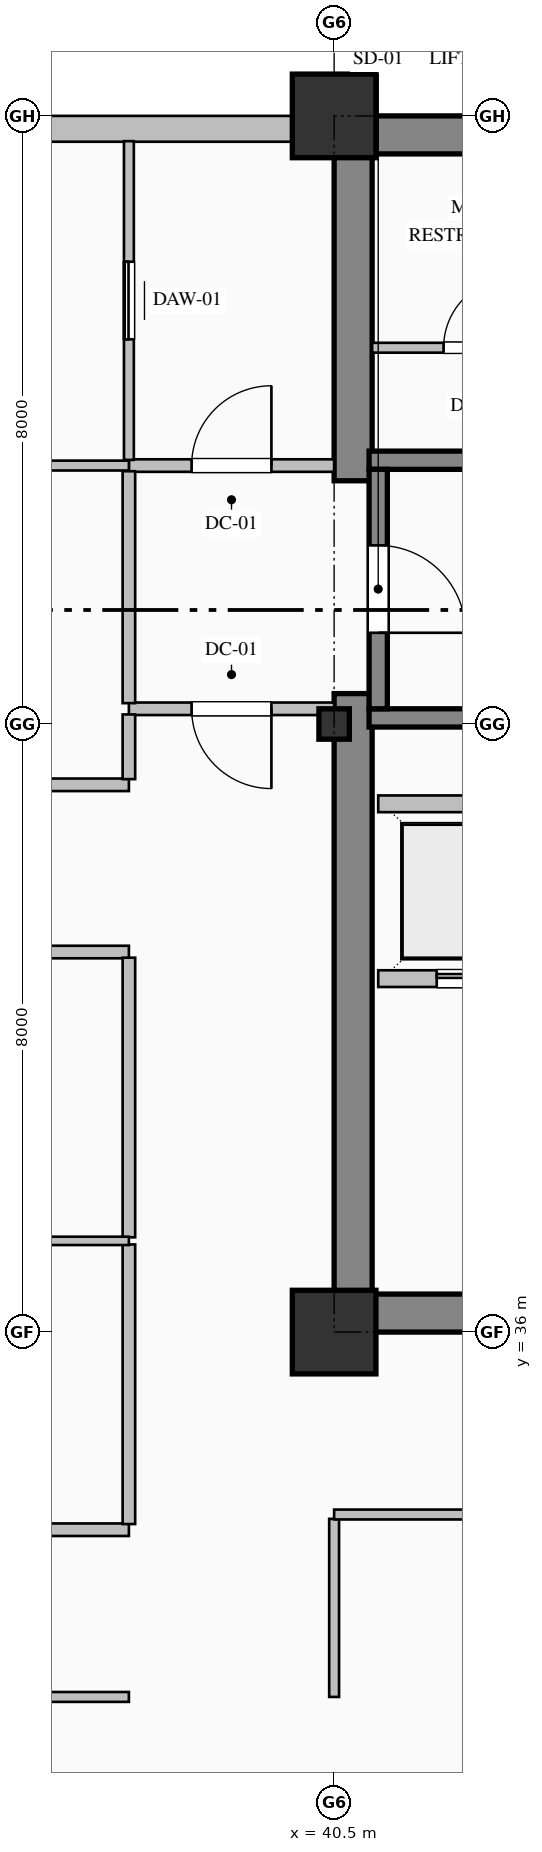
"""IFC4 building model, lengths in metres.
Left out: names, types, materials, properties, quantities, classifications, styles, units other than length and angle.
Written with IfcOpenShell. Run it as: python <this file> out.ifc"""

import sys

from ifc_helpers import new_model, si_unit, direction, frame, frame_2d, origin, origin_2d, place, context, subcontext, project, spatial, rectangle, hollow_rectangle, i_section, extrude, element, fill, save


model = new_model("IFC4")
c1 = context("Model", 3, precision=1e-05, world=origin(), true_north=direction((0.0, 1.0)))
c2 = subcontext(c1, "Body", "Model", "MODEL_VIEW")
j1 = project(units=[si_unit("LENGTHUNIT", "METRE"), si_unit("PLANEANGLEUNIT", "RADIAN")], contexts=[c1])
p1 = place(None, origin())
s1 = spatial("IfcSite", under=j1, at=p1, CompositionType="ELEMENT")
p2 = place(p1, origin())
s2 = spatial("IfcBuilding", under=s1, at=p2, CompositionType="ELEMENT")
p3 = place(p2, frame((0.0, 0.0, 187.0)))
s3 = spatial("IfcBuildingStorey", under=s2, at=p3, CompositionType="ELEMENT", Elevation=187.0)
p4 = place(p3, frame((40.5, 51.75, 0.0), z_axis=(0.0, 0.0, 1.0), x_axis=(1.0, 0.0, 0.0)))
e1 = element("IfcWall", 1, at=p4, inside=s3, PredefinedType="SHEAR", context=c2, shape_type="SweptSolid", body=[
    extrude(rectangle(XDim=23.5, YDim=0.5, at=frame_2d((11.75, 0.0))), origin(), (0.0, 0.0, 1.0), 3.765),
])
p5 = place(p3, frame((40.75, 36.5, 0.0), z_axis=(0.0, 0.0, 1.0), x_axis=(0.0, 1.0, 0.0)))
e2 = element("IfcWall", 2, at=p5, inside=s3, PredefinedType="SHEAR", context=c2, shape_type="SweptSolid", body=[
    extrude(rectangle(XDim=7.9, YDim=0.5, at=frame_2d((3.95, 0.0))), origin(), (0.0, 0.0, 1.0), 3.765),
])
p6 = place(p3, frame((40.75, 47.2, 0.0), z_axis=(0.0, 0.0, 1.0), x_axis=(0.0, 1.0, 0.0)))
e3 = element("IfcWall", 3, at=p6, inside=s3, PredefinedType="SHEAR", context=c2, shape_type="SweptSolid", body=[
    extrude(rectangle(XDim=4.3, YDim=0.5, at=frame_2d((2.15, 0.0))), origin(), (0.0, 0.0, 1.0), 3.765),
])
p7 = place(p3, frame((40.5, 36.25, 0.0), z_axis=(0.0, 0.0, 1.0), x_axis=(1.0, 0.0, 0.0)))
e4 = element("IfcWall", 4, at=p7, inside=s3, PredefinedType="SHEAR", context=c2, shape_type="SweptSolid", body=[
    extrude(rectangle(XDim=9.1, YDim=0.5, at=frame_2d((4.55, 0.0))), origin(), (0.0, 0.0, 1.0), 3.765),
])
p8 = place(p3, frame((40.5, 36.0, 0.0), z_axis=(0.0, 0.0, 1.0), x_axis=(1.0, 0.0, 0.0)))
e5 = element("IfcColumn", 5, at=p8, inside=s3, PredefinedType="COLUMN", context=c2, shape_type="SweptSolid", body=[
    extrude(hollow_rectangle(XDim=1.1, YDim=1.1, WallThickness=0.04, at=origin_2d()), origin(), (0.0, 0.0, 1.0), 4.0),
])
p9 = place(p3, frame((40.5, 44.0, 0.0), z_axis=(0.0, 0.0, 1.0), x_axis=(1.0, 0.0, 0.0)))
e6 = element("IfcColumn", 6, at=p9, inside=s3, PredefinedType="COLUMN", context=c2, shape_type="SweptSolid", body=[
    extrude(i_section(OverallWidth=0.4, OverallDepth=0.4, WebThickness=0.013, FlangeThickness=0.021, FilletRadius=0.022, at=origin_2d()), origin(), (0.0, 0.0, 1.0), 4.0),
])
p10 = place(p3, frame((40.5, 52.0, 0.0), z_axis=(0.0, 0.0, 1.0), x_axis=(1.0, 0.0, 0.0)))
e7 = element("IfcColumn", 7, at=p10, inside=s3, PredefinedType="COLUMN", context=c2, shape_type="SweptSolid", body=[
    extrude(hollow_rectangle(XDim=1.1, YDim=1.1, WallThickness=0.04, at=origin_2d()), origin(), (0.0, 0.0, 1.0), 4.0),
])
p11 = place(p3, frame((13.0, 51.83, 0.0), z_axis=(0.0, 0.0, 1.0), x_axis=(1.0, 0.0, 0.0)))
e8 = element("IfcWall", 8, at=p11, inside=s3, PredefinedType="SOLIDWALL", context=c2, shape_type="SweptSolid", body=[
    extrude(rectangle(XDim=27.52, YDim=0.34, at=frame_2d((13.76, 0.0))), origin(), (0.0, 0.0, 1.0), 3.265),
])
p12 = place(p11, frame((6.45, 0.0, 0.85)))
e9 = element("IfcOpeningElement", 9, at=p12, cuts=e8, PredefinedType="OPENING", context=c2, shape_type="SweptSolid", body=[
    extrude(rectangle(XDim=1.5, YDim=1.95, at=frame_2d((0.75, 0.975))), frame((0.0, 0.18, 0.0), z_axis=(0.0, -1.0, 0.0), x_axis=(1.0, 0.0, 0.0)), (0.0, 0.0, 1.0), 0.36),
])
p13 = place(p11, frame((13.8, 0.0, 0.7)))
e10 = element("IfcOpeningElement", 10, at=p13, cuts=e8, PredefinedType="OPENING", context=c2, shape_type="SweptSolid", body=[
    extrude(rectangle(XDim=1.2, YDim=1.85, at=frame_2d((0.6, 0.925))), frame((0.0, 0.18, 0.0), z_axis=(0.0, -1.0, 0.0), x_axis=(1.0, 0.0, 0.0)), (0.0, 0.0, 1.0), 0.36),
])
for number, where, z_axis, x_axis in (
    (11, (40.96, 47.47, 0.0), (0.0, 0.0, 1.0), (1.0, 0.0, 0.0)),
    (12, (49.04, 44.08, 0.0), (0.0, 0.0, 1.0), (-1.0, 0.0, 0.0)),
):
    element("IfcWall", number, at=place(p3, frame(where, z_axis=z_axis, x_axis=x_axis)), inside=s3, PredefinedType="SOLIDWALL", context=c2, shape_type="SweptSolid", body=[
        extrude(rectangle(XDim=8.08, YDim=0.24, at=frame_2d((4.04, 0.0))), origin(), (0.0, 0.0, 1.0), 4.0),
    ])
p14 = place(p3, frame((41.08, 47.35, 0.0), z_axis=(0.0, 0.0, 1.0), x_axis=(0.0, -1.0, 0.0)))
e13 = element("IfcWall", 13, at=p14, inside=s3, PredefinedType="SOLIDWALL", context=c2, shape_type="SweptSolid", body=[
    extrude(rectangle(XDim=3.15, YDim=0.24, at=frame_2d((1.575, 0.0))), origin(), (0.0, 0.0, 1.0), 4.0),
])
p15 = place(p14, frame((1.0, 0.0, 0.0)))
e14 = element("IfcOpeningElement", 14, at=p15, cuts=e13, PredefinedType="OPENING", context=c2, shape_type="SweptSolid", body=[
    extrude(rectangle(XDim=1.15, YDim=2.2, at=frame_2d((0.575, 1.1))), frame((0.0, 0.13, 0.0), z_axis=(0.0, -1.0, 0.0), x_axis=(1.0, 0.0, 0.0)), (0.0, 0.0, 1.0), 0.26),
])
p16 = place(p3, frame((49.32, 40.65, 0.0), z_axis=(0.0, 0.0, 1.0), x_axis=(-1.0, 0.0, 0.0)))
e15 = element("IfcWall", 15, at=p16, inside=s3, PredefinedType="PARTITIONING", context=c2, shape_type="SweptSolid", body=[
    extrude(rectangle(XDim=8.24, YDim=0.22, at=frame_2d((4.12, 0.0))), origin(), (0.0, 0.0, 1.0), 3.765),
])
p17 = place(p16, frame((6.37, 0.0, 0.0)))
e16 = element("IfcOpeningElement", 16, at=p17, cuts=e15, PredefinedType="OPENING", context=c2, shape_type="SweptSolid", body=[
    extrude(rectangle(XDim=1.1, YDim=2.2, at=frame_2d((0.55, 1.1))), frame((0.0, 0.12, 0.0), z_axis=(0.0, -1.0, 0.0), x_axis=(1.0, 0.0, 0.0)), (0.0, 0.0, 1.0), 0.24),
])
p18 = place(p16, frame((3.57, 0.0, 0.0)))
e17 = element("IfcOpeningElement", 17, at=p18, cuts=e15, PredefinedType="OPENING", context=c2, shape_type="SweptSolid", body=[
    extrude(rectangle(XDim=1.1, YDim=2.2, at=frame_2d((0.55, 1.1))), frame((0.0, 0.12, 0.0), z_axis=(0.0, -1.0, 0.0), x_axis=(1.0, 0.0, 0.0)), (0.0, 0.0, 1.0), 0.24),
])
p19 = place(p16, frame((0.77, 0.0, 0.0)))
e18 = element("IfcOpeningElement", 18, at=p19, cuts=e15, PredefinedType="OPENING", context=c2, shape_type="SweptSolid", body=[
    extrude(rectangle(XDim=1.1, YDim=2.2, at=frame_2d((0.55, 1.1))), frame((0.0, 0.12, 0.0), z_axis=(0.0, -1.0, 0.0), x_axis=(1.0, 0.0, 0.0)), (0.0, 0.0, 1.0), 0.24),
])
p20 = place(p3, frame((41.08, 42.95, 0.0), z_axis=(0.0, 0.0, 1.0), x_axis=(1.0, 0.0, 0.0)))
e19 = element("IfcWall", 19, at=p20, inside=s3, PredefinedType="PARTITIONING", context=c2, shape_type="SweptSolid", body=[
    extrude(rectangle(XDim=8.24, YDim=0.22, at=frame_2d((4.12, 0.0))), origin(), (0.0, 0.0, 1.0), 3.765),
])
p21 = place(p3, frame((37.8, 47.4, 0.0), z_axis=(0.0, 0.0, 1.0), x_axis=(1.0, 0.0, 0.0)))
e20 = element("IfcWall", 20, at=p21, inside=s3, PredefinedType="PARTITIONING", context=c2, shape_type="SweptSolid", body=[
    extrude(rectangle(XDim=2.7, YDim=0.165, at=frame_2d((1.35, 0.0))), origin(), (0.0, 0.0, 1.0), 3.765),
])
p22 = place(p21, frame((0.825, 0.0, 0.0)))
e21 = element("IfcOpeningElement", 21, at=p22, cuts=e20, PredefinedType="OPENING", context=c2, shape_type="SweptSolid", body=[
    extrude(rectangle(XDim=1.05, YDim=2.15, at=frame_2d((0.525, 1.075))), frame((0.0, 0.093, 0.0), z_axis=(0.0, -1.0, 0.0), x_axis=(1.0, 0.0, 0.0)), (0.0, 0.0, 1.0), 0.185),
])
p23 = place(p3, frame((40.5, 44.2, 0.0), z_axis=(0.0, 0.0, 1.0), x_axis=(-1.0, 0.0, 0.0)))
e22 = element("IfcWall", 22, at=p23, inside=s3, PredefinedType="PARTITIONING", context=c2, shape_type="SweptSolid", body=[
    extrude(rectangle(XDim=2.7, YDim=0.165, at=frame_2d((1.35, 0.0))), origin(), (0.0, 0.0, 1.0), 3.765),
])
p24 = place(p23, frame((0.825, 0.0, 0.0)))
e23 = element("IfcOpeningElement", 23, at=p24, cuts=e22, PredefinedType="OPENING", context=c2, shape_type="SweptSolid", body=[
    extrude(rectangle(XDim=1.05, YDim=2.15, at=frame_2d((0.525, 1.075))), frame((0.0, 0.093, 0.0), z_axis=(0.0, -1.0, 0.0), x_axis=(1.0, 0.0, 0.0)), (0.0, 0.0, 1.0), 0.185),
])
p25 = place(p3, frame((37.8, 44.274, 0.0), z_axis=(0.0, 0.0, 1.0), x_axis=(0.0, 1.0, 0.0)))
e24 = element("IfcWall", 24, at=p25, inside=s3, PredefinedType="PARTITIONING", context=c2, shape_type="SweptSolid", body=[
    extrude(rectangle(XDim=3.051, YDim=0.165, at=frame_2d((1.525, 0.0))), origin(), (0.0, 0.0, 1.0), 3.765),
])
p26 = place(p3, frame((37.8, 47.475, 0.0), z_axis=(0.0, 0.0, 1.0), x_axis=(0.0, 1.0, 0.0)))
e25 = element("IfcWall", 25, at=p26, inside=s3, PredefinedType="PARTITIONING", context=c2, shape_type="SweptSolid", body=[
    extrude(rectangle(XDim=4.193, YDim=0.13, at=frame_2d((2.097, 0.0))), origin(), (0.0, 0.0, 1.0), 3.765),
])
p27 = place(p26, frame((1.587, 0.0, 0.0)))
e26 = element("IfcOpeningElement", 26, at=p27, cuts=e25, PredefinedType="OPENING", context=c2, shape_type="SweptSolid", body=[
    extrude(rectangle(XDim=1.02, YDim=2.15, at=frame_2d((0.51, 1.075))), frame((0.0, 0.075, 0.0), z_axis=(0.0, -1.0, 0.0), x_axis=(1.0, 0.0, 0.0)), (0.0, 0.0, 1.0), 0.15),
])
p28 = place(p3, frame((37.8, 47.4, 0.0), z_axis=(0.0, 0.0, 1.0), x_axis=(-1.0, 0.0, 0.0)))
e27 = element("IfcWall", 27, at=p28, inside=s3, PredefinedType="PARTITIONING", context=c2, shape_type="SweptSolid", body=[
    extrude(rectangle(XDim=2.4, YDim=0.13, at=frame_2d((1.2, 0.0))), origin(), (0.0, 0.0, 1.0), 3.765),
])
p29 = place(p3, frame((41.0, 48.95, 0.0), z_axis=(0.0, 0.0, 1.0), x_axis=(1.0, 0.0, 0.0)))
e28 = element("IfcWall", 28, at=p29, inside=s3, PredefinedType="PARTITIONING", context=c2, shape_type="SweptSolid", body=[
    extrude(rectangle(XDim=2.8, YDim=0.13, at=frame_2d((1.4, 0.0))), origin(), (0.0, 0.0, 1.0), 3.765),
])
p30 = place(p29, frame((0.94, 0.0, 0.0)))
e29 = element("IfcOpeningElement", 29, at=p30, cuts=e28, PredefinedType="OPENING", context=c2, shape_type="SweptSolid", body=[
    extrude(rectangle(XDim=0.92, YDim=2.15, at=frame_2d((0.46, 1.075))), frame((0.0, 0.075, 0.0), z_axis=(0.0, -1.0, 0.0), x_axis=(1.0, 0.0, 0.0)), (0.0, 0.0, 1.0), 0.15),
])
p31 = place(p3, frame((18.7, 33.4, 0.0), z_axis=(0.0, 0.0, 1.0), x_axis=(1.0, 0.0, 0.0)))
e30 = element("IfcWall", 30, at=p31, inside=s3, PredefinedType="PARTITIONING", context=c2, shape_type="SweptSolid", body=[
    extrude(rectangle(XDim=19.1, YDim=0.165, at=frame_2d((9.55, 0.0))), origin(), (0.0, 0.0, 1.0), 3.765),
])
p32 = place(p31, frame((9.1, 0.0, 0.0)))
e31 = element("IfcOpeningElement", 31, at=p32, cuts=e30, PredefinedType="OPENING", context=c2, shape_type="SweptSolid", body=[
    extrude(rectangle(XDim=0.9, YDim=2.15, at=frame_2d((0.45, 1.075))), frame((0.0, 0.093, 0.0), z_axis=(0.0, -1.0, 0.0), x_axis=(1.0, 0.0, 0.0)), (0.0, 0.0, 1.0), 0.185),
])
p33 = place(p3, frame((37.8, 31.2, 0.0), z_axis=(0.0, 0.0, 1.0), x_axis=(-1.0, 0.0, 0.0)))
e32 = element("IfcWall", 32, at=p33, inside=s3, PredefinedType="PARTITIONING", context=c2, shape_type="SweptSolid", body=[
    extrude(rectangle(XDim=10.8, YDim=0.13, at=frame_2d((5.4, 0.0))), origin(), (0.0, 0.0, 1.0), 3.765),
])
p34 = place(p33, frame((4.9, 0.0, 0.0)))
e33 = element("IfcOpeningElement", 33, at=p34, cuts=e32, PredefinedType="OPENING", context=c2, shape_type="SweptSolid", body=[
    extrude(rectangle(XDim=1.0, YDim=2.15, at=frame_2d((0.5, 1.075))), frame((0.0, 0.075, 0.0), z_axis=(0.0, -1.0, 0.0), x_axis=(1.0, 0.0, 0.0)), (0.0, 0.0, 1.0), 0.15),
])
p35 = place(p3, frame((30.6, 43.2, 0.0), z_axis=(0.0, 0.0, 1.0), x_axis=(1.0, 0.0, 0.0)))
e34 = element("IfcWall", 34, at=p35, inside=s3, PredefinedType="PARTITIONING", context=c2, shape_type="SweptSolid", body=[
    extrude(rectangle(XDim=7.2, YDim=0.165, at=frame_2d((3.6, 0.0))), origin(), (0.0, 0.0, 1.0), 3.765),
])
p36 = place(p35, frame((3.05, 0.0, 0.0)))
e35 = element("IfcOpeningElement", 35, at=p36, cuts=e34, PredefinedType="OPENING", context=c2, shape_type="SweptSolid", body=[
    extrude(rectangle(XDim=1.1, YDim=2.2, at=frame_2d((0.55, 1.1))), frame((0.0, 0.093, 0.0), z_axis=(0.0, -1.0, 0.0), x_axis=(1.0, 0.0, 0.0)), (0.0, 0.0, 1.0), 0.185),
])
p37 = place(p3, frame((37.8, 41.0, 0.0), z_axis=(0.0, 0.0, 1.0), x_axis=(-1.0, 0.0, 0.0)))
e36 = element("IfcWall", 36, at=p37, inside=s3, PredefinedType="PARTITIONING", context=c2, shape_type="SweptSolid", body=[
    extrude(rectangle(XDim=19.1, YDim=0.165, at=frame_2d((9.55, 0.0))), origin(), (0.0, 0.0, 1.0), 3.765),
])
p38 = place(p37, frame((9.05, 0.0, 0.0)))
e37 = element("IfcOpeningElement", 37, at=p38, cuts=e36, PredefinedType="OPENING", context=c2, shape_type="SweptSolid", body=[
    extrude(rectangle(XDim=1.0, YDim=2.15, at=frame_2d((0.5, 1.075))), frame((0.0, 0.093, 0.0), z_axis=(0.0, -1.0, 0.0), x_axis=(1.0, 0.0, 0.0)), (0.0, 0.0, 1.0), 0.185),
])
p39 = place(p3, frame((37.8, 43.274, 0.0), z_axis=(0.0, 0.0, 1.0), x_axis=(0.0, 1.0, 0.0)))
e38 = element("IfcWall", 38, at=p39, inside=s3, PredefinedType="PARTITIONING", context=c2, shape_type="SweptSolid", body=[
    extrude(rectangle(XDim=0.851, YDim=0.165, at=frame_2d((0.426, 0.0))), origin(), (0.0, 0.0, 1.0), 3.765),
])
for number, where, z_axis, x_axis in (
    (39, (37.8, 33.475, 0.0), (0.0, 0.0, 1.0), (0.0, 1.0, 0.0)),
    (40, (37.8, 37.247, 0.0), (0.0, 0.0, 1.0), (0.0, 1.0, 0.0)),
):
    element("IfcWall", number, at=place(p3, frame(where, z_axis=z_axis, x_axis=x_axis)), inside=s3, PredefinedType="PARTITIONING", context=c2, shape_type="SweptSolid", body=[
        extrude(rectangle(XDim=3.678, YDim=0.165, at=frame_2d((1.839, 0.0))), origin(), (0.0, 0.0, 1.0), 3.765),
    ])
p40 = place(p3, frame((40.5, 33.543, 0.0), z_axis=(0.0, 0.0, 1.0), x_axis=(0.0, -1.0, 0.0)))
e41 = element("IfcWall", 41, at=p40, inside=s3, PredefinedType="PARTITIONING", context=c2, shape_type="SweptSolid", body=[
    extrude(rectangle(XDim=2.343, YDim=0.13, at=frame_2d((1.171, 0.0))), origin(), (0.0, 0.0, 1.0), 3.157),
])
p41 = place(p3, frame((50.8, 33.6, 0.0), z_axis=(0.0, 0.0, 1.0), x_axis=(-1.0, 0.0, 0.0)))
e42 = element("IfcWall", 42, at=p41, inside=s3, PredefinedType="PARTITIONING", context=c2, shape_type="SweptSolid", body=[
    extrude(rectangle(XDim=10.3, YDim=0.13, at=frame_2d((5.15, 0.0))), origin(), (0.0, 0.0, 1.0), 3.765),
])
p42 = place(p3, frame((18.7, 37.2, 0.0), z_axis=(0.0, 0.0, 1.0), x_axis=(1.0, 0.0, 0.0)))
e43 = element("IfcWall", 43, at=p42, inside=s3, PredefinedType="MOVABLE", context=c2, shape_type="SweptSolid", body=[
    extrude(rectangle(XDim=19.1, YDim=0.11, at=frame_2d((9.55, 0.0))), origin(), (0.0, 0.0, 1.0), 3.765),
])
p43 = place(p15, origin())
e44 = element("IfcDoor", 44, at=p43, inside=s3, OperationType="SINGLE_SWING_RIGHT", PredefinedType="DOOR", context=c2, shape_type="SweptSolid", body=[
    extrude(rectangle(XDim=1.15, YDim=2.2, at=frame_2d((0.575, 1.1))), frame((0.0, 0.025, 0.0), z_axis=(0.0, -1.0, 0.0), x_axis=(1.0, 0.0, 0.0)), (0.0, 0.0, 1.0), 0.05),
])
fill(e14, e44)
p44 = place(p17, origin())
e45 = element("IfcDoor", 45, at=p44, inside=s3, OperationType="DOUBLE_DOOR_SLIDING", PredefinedType="DOOR", context=c2, shape_type="SweptSolid", body=[
    extrude(rectangle(XDim=1.1, YDim=2.2, at=frame_2d((0.55, 1.1))), frame((0.0, 0.025, 0.0), z_axis=(0.0, -1.0, 0.0), x_axis=(1.0, 0.0, 0.0)), (0.0, 0.0, 1.0), 0.05),
])
fill(e16, e45)
p45 = place(p22, origin())
e46 = element("IfcDoor", 46, at=p45, inside=s3, OperationType="SINGLE_SWING_RIGHT", PredefinedType="DOOR", context=c2, shape_type="SweptSolid", body=[
    extrude(rectangle(XDim=1.05, YDim=2.15, at=frame_2d((0.525, 1.075))), frame((0.0, 0.025, 0.0), z_axis=(0.0, -1.0, 0.0), x_axis=(1.0, 0.0, 0.0)), (0.0, 0.0, 1.0), 0.05),
])
fill(e21, e46)
p46 = place(p24, origin())
e47 = element("IfcDoor", 47, at=p46, inside=s3, OperationType="SINGLE_SWING_LEFT", PredefinedType="DOOR", context=c2, shape_type="SweptSolid", body=[
    extrude(rectangle(XDim=1.05, YDim=2.15, at=frame_2d((0.525, 1.075))), frame((0.0, 0.025, 0.0), z_axis=(0.0, -1.0, 0.0), x_axis=(1.0, 0.0, 0.0)), (0.0, 0.0, 1.0), 0.05),
])
fill(e23, e47)
p47 = place(p27, origin())
e48 = element("IfcDoor", 48, at=p47, inside=s3, OperationType="SLIDING_TO_LEFT", PredefinedType="DOOR", context=c2, shape_type="SweptSolid", body=[
    extrude(rectangle(XDim=1.02, YDim=2.15, at=frame_2d((0.51, 1.075))), frame((0.0, 0.025, 0.0), z_axis=(0.0, -1.0, 0.0), x_axis=(1.0, 0.0, 0.0)), (0.0, 0.0, 1.0), 0.05),
])
fill(e26, e48)
p48 = place(p30, origin())
e49 = element("IfcDoor", 49, at=p48, inside=s3, OperationType="SINGLE_SWING_RIGHT", PredefinedType="DOOR", context=c2, shape_type="SweptSolid", body=[
    extrude(rectangle(XDim=0.92, YDim=2.15, at=frame_2d((0.46, 1.075))), frame((0.0, 0.025, 0.0), z_axis=(0.0, -1.0, 0.0), x_axis=(1.0, 0.0, 0.0)), (0.0, 0.0, 1.0), 0.05),
])
fill(e29, e49)
save(model, sys.argv[1])
